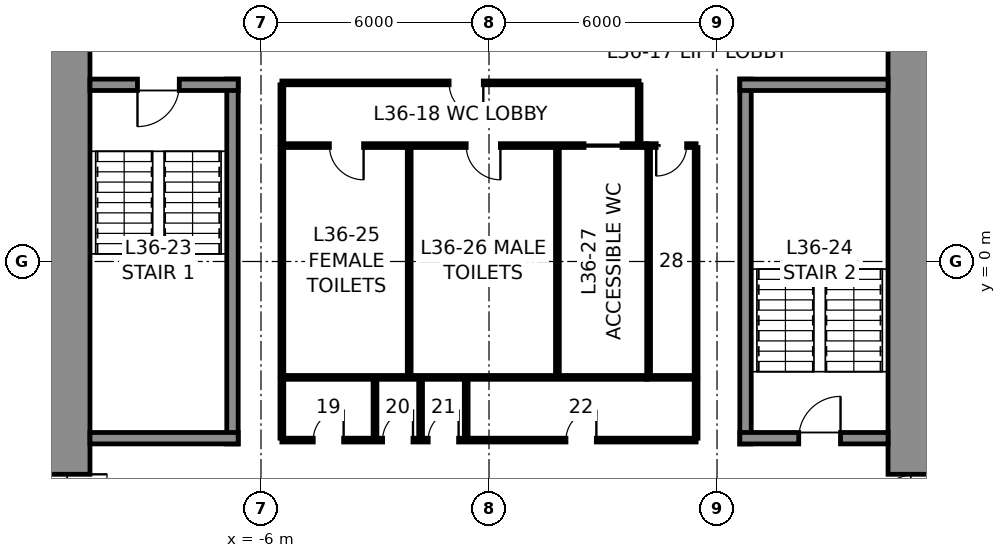
"""IFC4 building model, lengths in metres.
Left out: names, types, materials, properties, quantities, classifications, styles, units other than length and angle.
Written with IfcOpenShell. Run it as: python <this file> out.ifc"""

import sys

from ifc_helpers import new_model, si_unit, direction, frame, frame_2d, origin, place, context, subcontext, project, spatial, rectangle, extrude, element, fill, save


model = new_model("IFC4")
c1 = context("Model", 3, precision=1e-05, world=origin(), true_north=direction((0.0, 1.0)))
c2 = subcontext(c1, "Body", "Model", "MODEL_VIEW")
j1 = project(units=[si_unit("LENGTHUNIT", "METRE"), si_unit("PLANEANGLEUNIT", "RADIAN")], contexts=[c1])
p1 = place(None, origin())
s1 = spatial("IfcSite", under=j1, at=p1, CompositionType="ELEMENT")
p2 = place(p1, origin())
s2 = spatial("IfcBuilding", under=s1, at=p2, CompositionType="ELEMENT")
p3 = place(p2, frame((0.0, 0.0, 171.8)))
s3 = spatial("IfcBuildingStorey", under=s2, at=p3, CompositionType="ELEMENT", Elevation=171.8)
p4 = place(p3, frame((11.25, 10.5, 0.0), z_axis=(0.0, 0.0, 1.0), x_axis=(0.0, -1.0, 0.0)))
e1 = element("IfcWall", 1, at=p4, inside=s3, PredefinedType="SHEAR", context=c2, shape_type="SweptSolid", body=[
    extrude(rectangle(XDim=21.0, YDim=1.5, at=frame_2d((10.5, 0.0))), origin(), (0.0, 0.0, 1.0), 4.0),
])
p5 = place(p4, frame((3.7, 0.0, 0.0)))
e2 = element("IfcOpeningElement", 2, at=p5, cuts=e1, PredefinedType="OPENING", context=c2, shape_type="SweptSolid", body=[
    extrude(rectangle(XDim=1.2, YDim=2.3, at=frame_2d((0.6, 1.15))), frame((0.0, 0.76, 0.0), z_axis=(0.0, -1.0, 0.0), x_axis=(1.0, 0.0, 0.0)), (0.0, 0.0, 1.0), 1.52),
])
p6 = place(p4, frame((16.1, 0.0, 0.0)))
e3 = element("IfcOpeningElement", 3, at=p6, cuts=e1, PredefinedType="OPENING", context=c2, shape_type="SweptSolid", body=[
    extrude(rectangle(XDim=1.2, YDim=2.3, at=frame_2d((0.6, 1.15))), frame((0.0, 0.76, 0.0), z_axis=(0.0, -1.0, 0.0), x_axis=(1.0, 0.0, 0.0)), (0.0, 0.0, 1.0), 1.52),
])
p7 = place(p3, frame((-11.25, -10.5, 0.0), z_axis=(0.0, 0.0, 1.0), x_axis=(0.0, 1.0, 0.0)))
e4 = element("IfcWall", 4, at=p7, inside=s3, PredefinedType="SHEAR", context=c2, shape_type="SweptSolid", body=[
    extrude(rectangle(XDim=21.0, YDim=1.5, at=frame_2d((10.5, 0.0))), origin(), (0.0, 0.0, 1.0), 4.0),
])
p8 = place(p7, frame((16.1, 0.0, 0.0)))
e5 = element("IfcOpeningElement", 5, at=p8, cuts=e4, PredefinedType="OPENING", context=c2, shape_type="SweptSolid", body=[
    extrude(rectangle(XDim=1.2, YDim=2.3, at=frame_2d((0.6, 1.15))), frame((0.0, 0.76, 0.0), z_axis=(0.0, -1.0, 0.0), x_axis=(1.0, 0.0, 0.0)), (0.0, 0.0, 1.0), 1.52),
])
p9 = place(p7, frame((3.7, 0.0, 0.0)))
e6 = element("IfcOpeningElement", 6, at=p9, cuts=e4, PredefinedType="OPENING", context=c2, shape_type="SweptSolid", body=[
    extrude(rectangle(XDim=1.2, YDim=2.3, at=frame_2d((0.6, 1.15))), frame((0.0, 0.76, 0.0), z_axis=(0.0, -1.0, 0.0), x_axis=(1.0, 0.0, 0.0)), (0.0, 0.0, 1.0), 1.52),
])
p10 = place(p3, frame((-6.75, -4.8, 0.0), z_axis=(0.0, 0.0, 1.0), x_axis=(0.0, 1.0, 0.0)))
e7 = element("IfcWall", 7, at=p10, inside=s3, PredefinedType="SOLIDWALL", context=c2, shape_type="SweptSolid", body=[
    extrude(rectangle(XDim=9.6, YDim=0.3, at=frame_2d((4.8, 0.0))), origin(), (0.0, 0.0, 1.0), 3.75),
])
p11 = place(p3, frame((-10.5, 4.65, 0.0), z_axis=(0.0, 0.0, 1.0), x_axis=(1.0, 0.0, 0.0)))
e8 = element("IfcWall", 8, at=p11, inside=s3, PredefinedType="SOLIDWALL", context=c2, shape_type="SweptSolid", body=[
    extrude(rectangle(XDim=3.9, YDim=0.3, at=frame_2d((1.95, 0.0))), origin(), (0.0, 0.0, 1.0), 3.75),
])
p12 = place(p11, frame((1.25, 0.0, 0.0)))
e9 = element("IfcOpeningElement", 9, at=p12, cuts=e8, PredefinedType="OPENING", context=c2, shape_type="SweptSolid", body=[
    extrude(rectangle(XDim=1.1, YDim=2.3, at=frame_2d((0.55, 1.15))), frame((0.0, 0.16, 0.0), z_axis=(0.0, -1.0, 0.0), x_axis=(1.0, 0.0, 0.0)), (0.0, 0.0, 1.0), 0.32),
])
p13 = place(p3, frame((-6.6, -4.65, 0.0), z_axis=(0.0, 0.0, 1.0), x_axis=(-1.0, 0.0, 0.0)))
e10 = element("IfcWall", 10, at=p13, inside=s3, PredefinedType="SOLIDWALL", context=c2, shape_type="SweptSolid", body=[
    extrude(rectangle(XDim=3.9, YDim=0.3, at=frame_2d((1.95, 0.0))), origin(), (0.0, 0.0, 1.0), 3.75),
])
p14 = place(p3, frame((6.75, -4.8, 0.0), z_axis=(0.0, 0.0, 1.0), x_axis=(0.0, 1.0, 0.0)))
e11 = element("IfcWall", 11, at=p14, inside=s3, PredefinedType="SOLIDWALL", context=c2, shape_type="SweptSolid", body=[
    extrude(rectangle(XDim=9.6, YDim=0.3, at=frame_2d((4.8, 0.0))), origin(), (0.0, 0.0, 1.0), 3.75),
])
p15 = place(p3, frame((6.6, 4.65, 0.0), z_axis=(0.0, 0.0, 1.0), x_axis=(1.0, 0.0, 0.0)))
e12 = element("IfcWall", 12, at=p15, inside=s3, PredefinedType="SOLIDWALL", context=c2, shape_type="SweptSolid", body=[
    extrude(rectangle(XDim=3.9, YDim=0.3, at=frame_2d((1.95, 0.0))), origin(), (0.0, 0.0, 1.0), 3.75),
])
p16 = place(p3, frame((10.5, -4.65, 0.0), z_axis=(0.0, 0.0, 1.0), x_axis=(-1.0, 0.0, 0.0)))
e13 = element("IfcWall", 13, at=p16, inside=s3, PredefinedType="SOLIDWALL", context=c2, shape_type="SweptSolid", body=[
    extrude(rectangle(XDim=3.9, YDim=0.3, at=frame_2d((1.95, 0.0))), origin(), (0.0, 0.0, 1.0), 3.75),
])
p17 = place(p16, frame((1.25, 0.0, 0.0)))
e14 = element("IfcOpeningElement", 14, at=p17, cuts=e13, PredefinedType="OPENING", context=c2, shape_type="SweptSolid", body=[
    extrude(rectangle(XDim=1.1, YDim=2.3, at=frame_2d((0.55, 1.15))), frame((0.0, 0.16, 0.0), z_axis=(0.0, -1.0, 0.0), x_axis=(1.0, 0.0, 0.0)), (0.0, 0.0, 1.0), 0.32),
])
p18 = place(p3, frame((-5.45, 3.05, 0.0), z_axis=(0.0, 0.0, 1.0), x_axis=(1.0, 0.0, 0.0)))
e15 = element("IfcWall", 15, at=p18, inside=s3, PredefinedType="PARTITIONING", context=c2, shape_type="SweptSolid", body=[
    extrude(rectangle(XDim=9.6, YDim=0.1, at=frame_2d((4.8, 0.0))), origin(), (0.0, 0.0, 1.0), 3.75),
])
p19 = place(p18, frame((1.25, 0.0, 0.0)))
e16 = element("IfcOpeningElement", 16, at=p19, cuts=e15, PredefinedType="OPENING", context=c2, shape_type="SweptSolid", body=[
    extrude(rectangle(XDim=0.9, YDim=2.3, at=frame_2d((0.45, 1.15))), frame((0.0, 0.06, 0.0), z_axis=(0.0, -1.0, 0.0), x_axis=(1.0, 0.0, 0.0)), (0.0, 0.0, 1.0), 0.12),
])
p20 = place(p18, frame((4.85, 0.0, 0.0)))
e17 = element("IfcOpeningElement", 17, at=p20, cuts=e15, PredefinedType="OPENING", context=c2, shape_type="SweptSolid", body=[
    extrude(rectangle(XDim=0.9, YDim=2.3, at=frame_2d((0.45, 1.15))), frame((0.0, 0.06, 0.0), z_axis=(0.0, -1.0, 0.0), x_axis=(1.0, 0.0, 0.0)), (0.0, 0.0, 1.0), 0.12),
])
p21 = place(p18, frame((7.95, 0.0, 0.0)))
e18 = element("IfcOpeningElement", 18, at=p21, cuts=e15, PredefinedType="OPENING", context=c2, shape_type="SweptSolid", body=[
    extrude(rectangle(XDim=1.0, YDim=2.3, at=frame_2d((0.5, 1.15))), frame((0.0, 0.06, 0.0), z_axis=(0.0, -1.0, 0.0), x_axis=(1.0, 0.0, 0.0)), (0.0, 0.0, 1.0), 0.12),
])
p22 = place(p3, frame((4.15, 3.05, 0.0), z_axis=(0.0, 0.0, 1.0), x_axis=(1.0, 0.0, 0.0)))
e19 = element("IfcWall", 19, at=p22, inside=s3, PredefinedType="PARTITIONING", context=c2, shape_type="SweptSolid", body=[
    extrude(rectangle(XDim=1.3, YDim=0.1, at=frame_2d((0.65, 0.0))), origin(), (0.0, 0.0, 1.0), 3.75),
])
p23 = place(p22, frame((0.25, 0.0, 0.0)))
e20 = element("IfcOpeningElement", 20, at=p23, cuts=e19, PredefinedType="OPENING", context=c2, shape_type="SweptSolid", body=[
    extrude(rectangle(XDim=0.8, YDim=2.3, at=frame_2d((0.4, 1.15))), frame((0.0, 0.06, 0.0), z_axis=(0.0, -1.0, 0.0), x_axis=(1.0, 0.0, 0.0)), (0.0, 0.0, 1.0), 0.12),
])
p24 = place(p3, frame((4.15, -3.05, 0.0), z_axis=(0.0, 0.0, 1.0), x_axis=(-1.0, 0.0, 0.0)))
e21 = element("IfcWall", 21, at=p24, inside=s3, PredefinedType="PARTITIONING", context=c2, shape_type="SweptSolid", body=[
    extrude(rectangle(XDim=9.6, YDim=0.1, at=frame_2d((4.8, 0.0))), origin(), (0.0, 0.0, 1.0), 3.75),
])
p25 = place(p3, frame((5.45, -3.05, 0.0), z_axis=(0.0, 0.0, 1.0), x_axis=(-1.0, 0.0, 0.0)))
e22 = element("IfcWall", 22, at=p25, inside=s3, PredefinedType="PARTITIONING", context=c2, shape_type="SweptSolid", body=[
    extrude(rectangle(XDim=1.3, YDim=0.1, at=frame_2d((0.65, 0.0))), origin(), (0.0, 0.0, 1.0), 3.75),
])
for number, where, z_axis, x_axis in (
    (23, (5.45, 3.0, 0.0), (0.0, 0.0, 1.0), (0.0, -1.0, 0.0)),
    (24, (-5.45, -3.0, 0.0), (0.0, 0.0, 1.0), (0.0, 1.0, 0.0)),
    (25, (-2.1, -3.0, 0.0), (0.0, 0.0, 1.0), (0.0, 1.0, 0.0)),
    (26, (1.8, -3.0, 0.0), (0.0, 0.0, 1.0), (0.0, 1.0, 0.0)),
    (27, (4.2, -3.0, 0.0), (0.0, 0.0, 1.0), (0.0, 1.0, 0.0)),
):
    element("IfcWall", number, at=place(p3, frame(where, z_axis=z_axis, x_axis=x_axis)), inside=s3, PredefinedType="PARTITIONING", context=c2, shape_type="SweptSolid", body=[
        extrude(rectangle(XDim=6.0, YDim=0.1, at=frame_2d((3.0, 0.0))), origin(), (0.0, 0.0, 1.0), 3.75),
    ])
p26 = place(p3, frame((-5.45, 4.7, 0.0), z_axis=(0.0, 0.0, 1.0), x_axis=(1.0, 0.0, 0.0)))
e28 = element("IfcWall", 28, at=p26, inside=s3, PredefinedType="PARTITIONING", context=c2, shape_type="SweptSolid", body=[
    extrude(rectangle(XDim=9.4, YDim=0.1, at=frame_2d((4.7, 0.0))), origin(), (0.0, 0.0, 1.0), 3.75),
])
p27 = place(p26, frame((4.4, 0.0, 0.0)))
e29 = element("IfcOpeningElement", 29, at=p27, cuts=e28, PredefinedType="OPENING", context=c2, shape_type="SweptSolid", body=[
    extrude(rectangle(XDim=0.9, YDim=2.3, at=frame_2d((0.45, 1.15))), frame((0.0, 0.06, 0.0), z_axis=(0.0, -1.0, 0.0), x_axis=(1.0, 0.0, 0.0)), (0.0, 0.0, 1.0), 0.12),
])
for number, where, z_axis, x_axis in (
    (30, (-5.45, 3.1, 0.0), (0.0, 0.0, 1.0), (0.0, 1.0, 0.0)),
    (31, (3.95, 3.1, 0.0), (0.0, 0.0, 1.0), (0.0, 1.0, 0.0)),
):
    element("IfcWall", number, at=place(p3, frame(where, z_axis=z_axis, x_axis=x_axis)), inside=s3, PredefinedType="PARTITIONING", context=c2, shape_type="SweptSolid", body=[
        extrude(rectangle(XDim=1.55, YDim=0.1, at=frame_2d((0.775, 0.0))), origin(), (0.0, 0.0, 1.0), 3.75),
    ])
p28 = place(p3, frame((5.45, -4.7, 0.0), z_axis=(0.0, 0.0, 1.0), x_axis=(-1.0, 0.0, 0.0)))
e32 = element("IfcWall", 32, at=p28, inside=s3, PredefinedType="PARTITIONING", context=c2, shape_type="SweptSolid", body=[
    extrude(rectangle(XDim=10.9, YDim=0.1, at=frame_2d((5.45, 0.0))), origin(), (0.0, 0.0, 1.0), 3.75),
])
p29 = place(p28, frame((9.275, 0.0, 0.0)))
e33 = element("IfcOpeningElement", 33, at=p29, cuts=e32, PredefinedType="OPENING", context=c2, shape_type="SweptSolid", body=[
    extrude(rectangle(XDim=0.8, YDim=2.3, at=frame_2d((0.4, 1.15))), frame((0.0, 0.06, 0.0), z_axis=(0.0, -1.0, 0.0), x_axis=(1.0, 0.0, 0.0)), (0.0, 0.0, 1.0), 0.12),
])
p30 = place(p28, frame((7.45, 0.0, 0.0)))
e34 = element("IfcOpeningElement", 34, at=p30, cuts=e32, PredefinedType="OPENING", context=c2, shape_type="SweptSolid", body=[
    extrude(rectangle(XDim=0.8, YDim=2.3, at=frame_2d((0.4, 1.15))), frame((0.0, 0.06, 0.0), z_axis=(0.0, -1.0, 0.0), x_axis=(1.0, 0.0, 0.0)), (0.0, 0.0, 1.0), 0.12),
])
p31 = place(p28, frame((6.25, 0.0, 0.0)))
e35 = element("IfcOpeningElement", 35, at=p31, cuts=e32, PredefinedType="OPENING", context=c2, shape_type="SweptSolid", body=[
    extrude(rectangle(XDim=0.8, YDim=2.3, at=frame_2d((0.4, 1.15))), frame((0.0, 0.06, 0.0), z_axis=(0.0, -1.0, 0.0), x_axis=(1.0, 0.0, 0.0)), (0.0, 0.0, 1.0), 0.12),
])
p32 = place(p28, frame((2.625, 0.0, 0.0)))
e36 = element("IfcOpeningElement", 36, at=p32, cuts=e32, PredefinedType="OPENING", context=c2, shape_type="SweptSolid", body=[
    extrude(rectangle(XDim=0.8, YDim=2.3, at=frame_2d((0.4, 1.15))), frame((0.0, 0.06, 0.0), z_axis=(0.0, -1.0, 0.0), x_axis=(1.0, 0.0, 0.0)), (0.0, 0.0, 1.0), 0.12),
])
for number, where, z_axis, x_axis in (
    (37, (-5.45, -3.1, 0.0), (0.0, 0.0, 1.0), (0.0, -1.0, 0.0)),
    (38, (5.45, -3.1, 0.0), (0.0, 0.0, 1.0), (0.0, -1.0, 0.0)),
    (39, (-3.0, -3.1, 0.0), (0.0, 0.0, 1.0), (0.0, -1.0, 0.0)),
    (40, (-1.8, -3.1, 0.0), (0.0, 0.0, 1.0), (0.0, -1.0, 0.0)),
    (41, (-0.6, -3.1, 0.0), (0.0, 0.0, 1.0), (0.0, -1.0, 0.0)),
):
    element("IfcWall", number, at=place(p3, frame(where, z_axis=z_axis, x_axis=x_axis)), inside=s3, PredefinedType="PARTITIONING", context=c2, shape_type="SweptSolid", body=[
        extrude(rectangle(XDim=1.55, YDim=0.1, at=frame_2d((0.775, 0.0))), origin(), (0.0, 0.0, 1.0), 3.75),
    ])
p33 = place(p12, frame((1.1, 0.0, 0.0), z_axis=(0.0, 0.0, 1.0), x_axis=(-1.0, 0.0, 0.0)))
e42 = element("IfcDoor", 42, at=p33, inside=s3, OperationType="SINGLE_SWING_RIGHT", PredefinedType="DOOR", context=c2, shape_type="SweptSolid", body=[
    extrude(rectangle(XDim=1.1, YDim=2.3, at=frame_2d((0.55, 1.15))), frame((0.0, 0.025, 0.0), z_axis=(0.0, -1.0, 0.0), x_axis=(1.0, 0.0, 0.0)), (0.0, 0.0, 1.0), 0.05),
])
fill(e9, e42)
p34 = place(p17, frame((1.1, 0.0, 0.0), z_axis=(0.0, 0.0, 1.0), x_axis=(-1.0, 0.0, 0.0)))
e43 = element("IfcDoor", 43, at=p34, inside=s3, OperationType="SINGLE_SWING_RIGHT", PredefinedType="DOOR", context=c2, shape_type="SweptSolid", body=[
    extrude(rectangle(XDim=1.1, YDim=2.3, at=frame_2d((0.55, 1.15))), frame((0.0, 0.025, 0.0), z_axis=(0.0, -1.0, 0.0), x_axis=(1.0, 0.0, 0.0)), (0.0, 0.0, 1.0), 0.05),
])
fill(e14, e43)
p35 = place(p19, frame((0.9, 0.0, 0.0), z_axis=(0.0, 0.0, 1.0), x_axis=(-1.0, 0.0, 0.0)))
e44 = element("IfcDoor", 44, at=p35, inside=s3, OperationType="SINGLE_SWING_LEFT", PredefinedType="DOOR", context=c2, shape_type="SweptSolid", body=[
    extrude(rectangle(XDim=0.9, YDim=2.3, at=frame_2d((0.45, 1.15))), frame((0.0, 0.025, 0.0), z_axis=(0.0, -1.0, 0.0), x_axis=(1.0, 0.0, 0.0)), (0.0, 0.0, 1.0), 0.05),
])
fill(e16, e44)
p36 = place(p20, frame((0.9, 0.0, 0.0), z_axis=(0.0, 0.0, 1.0), x_axis=(-1.0, 0.0, 0.0)))
e45 = element("IfcDoor", 45, at=p36, inside=s3, OperationType="SINGLE_SWING_LEFT", PredefinedType="DOOR", context=c2, shape_type="SweptSolid", body=[
    extrude(rectangle(XDim=0.9, YDim=2.3, at=frame_2d((0.45, 1.15))), frame((0.0, 0.025, 0.0), z_axis=(0.0, -1.0, 0.0), x_axis=(1.0, 0.0, 0.0)), (0.0, 0.0, 1.0), 0.05),
])
fill(e17, e45)
p37 = place(p21, frame((1.0, 0.0, 0.0), z_axis=(0.0, 0.0, 1.0), x_axis=(-1.0, 0.0, 0.0)))
e46 = element("IfcDoor", 46, at=p37, inside=s3, OperationType="SLIDING_TO_LEFT", PredefinedType="DOOR", context=c2, shape_type="SweptSolid", body=[
    extrude(rectangle(XDim=1.0, YDim=2.3, at=frame_2d((0.5, 1.15))), frame((0.0, 0.025, 0.0), z_axis=(0.0, -1.0, 0.0), x_axis=(1.0, 0.0, 0.0)), (0.0, 0.0, 1.0), 0.05),
])
fill(e18, e46)
p38 = place(p23, frame((0.8, 0.0, 0.0), z_axis=(0.0, 0.0, 1.0), x_axis=(-1.0, 0.0, 0.0)))
e47 = element("IfcDoor", 47, at=p38, inside=s3, OperationType="SINGLE_SWING_RIGHT", PredefinedType="DOOR", context=c2, shape_type="SweptSolid", body=[
    extrude(rectangle(XDim=0.8, YDim=2.3, at=frame_2d((0.4, 1.15))), frame((0.0, 0.025, 0.0), z_axis=(0.0, -1.0, 0.0), x_axis=(1.0, 0.0, 0.0)), (0.0, 0.0, 1.0), 0.05),
])
fill(e20, e47)
p39 = place(p27, frame((0.9, 0.0, 0.0), z_axis=(0.0, 0.0, 1.0), x_axis=(-1.0, 0.0, 0.0)))
e48 = element("IfcDoor", 48, at=p39, inside=s3, OperationType="SINGLE_SWING_LEFT", PredefinedType="DOOR", context=c2, shape_type="SweptSolid", body=[
    extrude(rectangle(XDim=0.9, YDim=2.3, at=frame_2d((0.45, 1.15))), frame((0.0, 0.025, 0.0), z_axis=(0.0, -1.0, 0.0), x_axis=(1.0, 0.0, 0.0)), (0.0, 0.0, 1.0), 0.05),
])
fill(e29, e48)
p40 = place(p29, frame((0.8, 0.0, 0.0), z_axis=(0.0, 0.0, 1.0), x_axis=(-1.0, 0.0, 0.0)))
e49 = element("IfcDoor", 49, at=p40, inside=s3, OperationType="SINGLE_SWING_RIGHT", PredefinedType="DOOR", context=c2, shape_type="SweptSolid", body=[
    extrude(rectangle(XDim=0.8, YDim=2.3, at=frame_2d((0.4, 1.15))), frame((0.0, 0.025, 0.0), z_axis=(0.0, -1.0, 0.0), x_axis=(1.0, 0.0, 0.0)), (0.0, 0.0, 1.0), 0.05),
])
fill(e33, e49)
p41 = place(p30, frame((0.8, 0.0, 0.0), z_axis=(0.0, 0.0, 1.0), x_axis=(-1.0, 0.0, 0.0)))
e50 = element("IfcDoor", 50, at=p41, inside=s3, OperationType="SINGLE_SWING_RIGHT", PredefinedType="DOOR", context=c2, shape_type="SweptSolid", body=[
    extrude(rectangle(XDim=0.8, YDim=2.3, at=frame_2d((0.4, 1.15))), frame((0.0, 0.025, 0.0), z_axis=(0.0, -1.0, 0.0), x_axis=(1.0, 0.0, 0.0)), (0.0, 0.0, 1.0), 0.05),
])
fill(e34, e50)
p42 = place(p31, frame((0.8, 0.0, 0.0), z_axis=(0.0, 0.0, 1.0), x_axis=(-1.0, 0.0, 0.0)))
e51 = element("IfcDoor", 51, at=p42, inside=s3, OperationType="SINGLE_SWING_RIGHT", PredefinedType="DOOR", context=c2, shape_type="SweptSolid", body=[
    extrude(rectangle(XDim=0.8, YDim=2.3, at=frame_2d((0.4, 1.15))), frame((0.0, 0.025, 0.0), z_axis=(0.0, -1.0, 0.0), x_axis=(1.0, 0.0, 0.0)), (0.0, 0.0, 1.0), 0.05),
])
fill(e35, e51)
p43 = place(p32, frame((0.8, 0.0, 0.0), z_axis=(0.0, 0.0, 1.0), x_axis=(-1.0, 0.0, 0.0)))
e52 = element("IfcDoor", 52, at=p43, inside=s3, OperationType="SINGLE_SWING_RIGHT", PredefinedType="DOOR", context=c2, shape_type="SweptSolid", body=[
    extrude(rectangle(XDim=0.8, YDim=2.3, at=frame_2d((0.4, 1.15))), frame((0.0, 0.025, 0.0), z_axis=(0.0, -1.0, 0.0), x_axis=(1.0, 0.0, 0.0)), (0.0, 0.0, 1.0), 0.05),
])
fill(e36, e52)
p44 = place(p9, frame((1.2, 0.0, 0.0), z_axis=(0.0, 0.0, 1.0), x_axis=(-1.0, 0.0, 0.0)))
e53 = element("IfcDoor", 53, at=p44, inside=s3, OperationType="SINGLE_SWING_LEFT", PredefinedType="DOOR", context=c2, shape_type="SweptSolid", body=[
    extrude(rectangle(XDim=1.2, YDim=2.3, at=frame_2d((0.6, 1.15))), frame((0.0, 0.025, 0.0), z_axis=(0.0, -1.0, 0.0), x_axis=(1.0, 0.0, 0.0)), (0.0, 0.0, 1.0), 0.05),
])
fill(e6, e53)
p45 = place(p6, frame((1.2, 0.0, 0.0), z_axis=(0.0, 0.0, 1.0), x_axis=(-1.0, 0.0, 0.0)))
e54 = element("IfcDoor", 54, at=p45, inside=s3, OperationType="SINGLE_SWING_LEFT", PredefinedType="DOOR", context=c2, shape_type="SweptSolid", body=[
    extrude(rectangle(XDim=1.2, YDim=2.3, at=frame_2d((0.6, 1.15))), frame((0.0, 0.025, 0.0), z_axis=(0.0, -1.0, 0.0), x_axis=(1.0, 0.0, 0.0)), (0.0, 0.0, 1.0), 0.05),
])
fill(e3, e54)
save(model, sys.argv[1])
